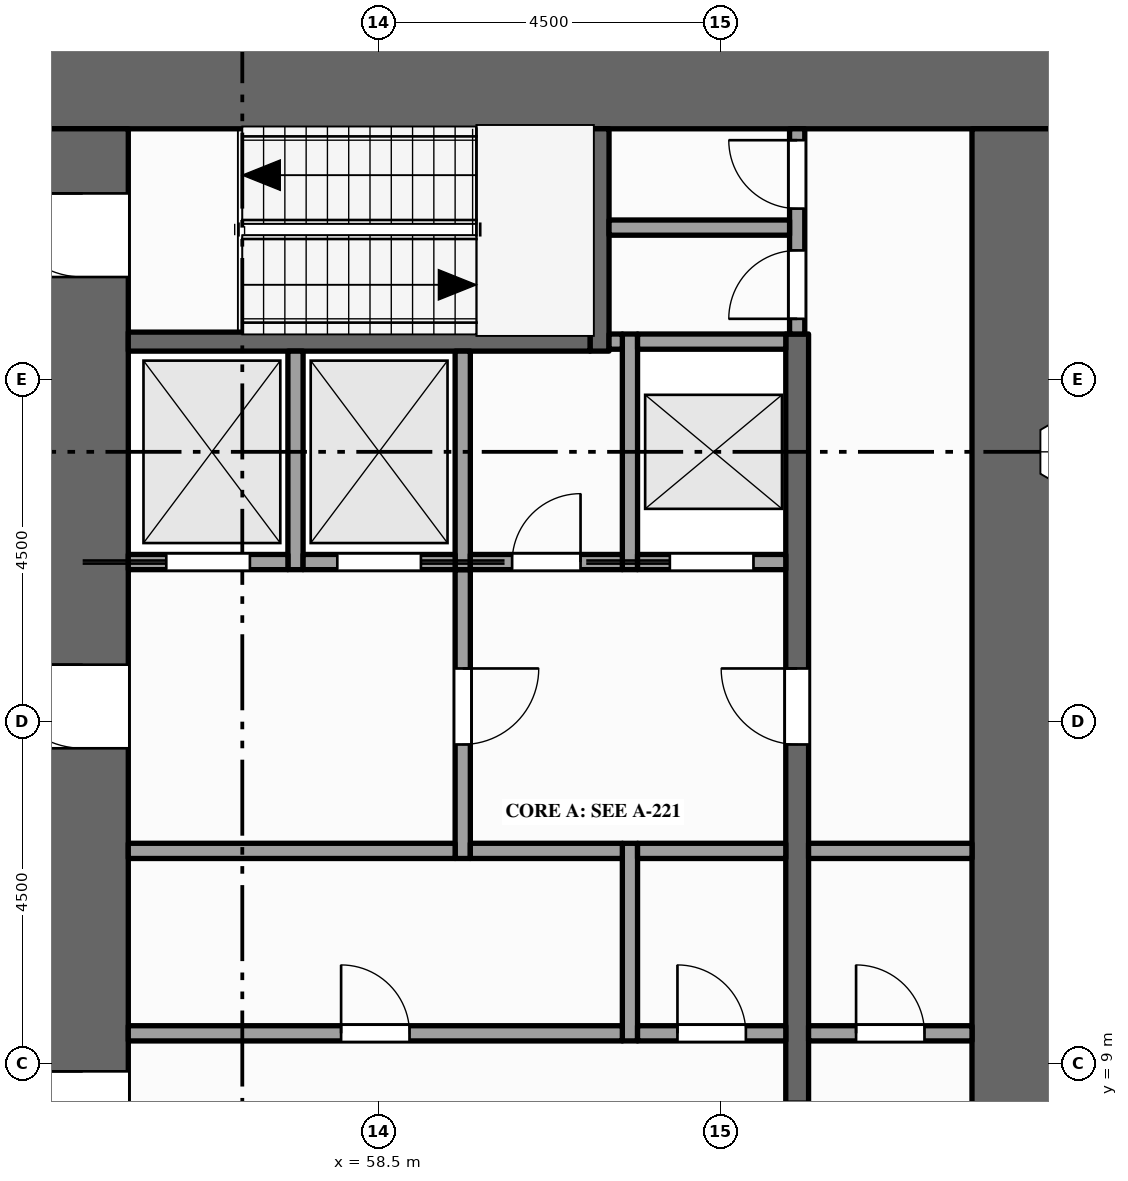
"""IFC4 building model, lengths in metres.
Left out: names, types, materials, properties, quantities, classifications, styles, units other than length and angle.
Written with IfcOpenShell. Run it as: python <this file> out.ifc"""

import sys

from ifc_helpers import new_model, si_unit, direction, frame, frame_2d, origin, place, context, subcontext, project, spatial, rectangle, extrude, element, fill, save


model = new_model("IFC4")
c1 = context("Model", 3, precision=1e-05, world=origin(), true_north=direction((0.0, 1.0)))
c2 = subcontext(c1, "Body", "Model", "MODEL_VIEW")
j1 = project(units=[si_unit("LENGTHUNIT", "METRE"), si_unit("PLANEANGLEUNIT", "RADIAN")], contexts=[c1])
p1 = place(None, origin())
s1 = spatial("IfcSite", under=j1, at=p1, CompositionType="ELEMENT")
p2 = place(p1, origin())
s2 = spatial("IfcBuilding", under=s1, at=p2, CompositionType="ELEMENT")
p3 = place(p2, frame((0.0, 0.0, 119.0)))
s3 = spatial("IfcBuildingStorey", under=s2, at=p3, CompositionType="ELEMENT", Elevation=119.0)
p4 = place(p3, frame((54.0, 21.9, -0.15), z_axis=(0.0, 0.0, 1.0), x_axis=(1.0, 0.0, 0.0)))
e1 = element("IfcWall", 1, at=p4, inside=s3, PredefinedType="SHEAR", context=c2, shape_type="SweptSolid", body=[
    extrude(rectangle(XDim=13.5, YDim=1.2, at=frame_2d((6.75, 0.0))), origin(), (0.0, 0.0, 1.0), 4.0),
])
p5 = place(p3, frame((54.6, 1.2, -0.15), z_axis=(0.0, 0.0, 1.0), x_axis=(0.0, 1.0, 0.0)))
e2 = element("IfcWall", 2, at=p5, inside=s3, PredefinedType="SHEAR", context=c2, shape_type="SweptSolid", body=[
    extrude(rectangle(XDim=20.1, YDim=1.2, at=frame_2d((10.05, 0.0))), origin(), (0.0, 0.0, 1.0), 4.0),
])
p6 = place(p5, frame((5.9, 0.0, 0.15)))
e3 = element("IfcOpeningElement", 3, at=p6, cuts=e2, PredefinedType="OPENING", context=c2, shape_type="SweptSolid", body=[
    extrude(rectangle(XDim=1.8, YDim=2.1, at=frame_2d((0.9, 1.05))), frame((0.0, 0.61, 0.0), z_axis=(0.0, -1.0, 0.0), x_axis=(1.0, 0.0, 0.0)), (0.0, 0.0, 1.0), 1.22),
])
p7 = place(p5, frame((11.95, 0.0, 0.15)))
e4 = element("IfcOpeningElement", 4, at=p7, cuts=e2, PredefinedType="OPENING", context=c2, shape_type="SweptSolid", body=[
    extrude(rectangle(XDim=1.1, YDim=2.1, at=frame_2d((0.55, 1.05))), frame((0.0, 0.61, 0.0), z_axis=(0.0, -1.0, 0.0), x_axis=(1.0, 0.0, 0.0)), (0.0, 0.0, 1.0), 1.22),
])
p8 = place(p5, frame((0.95, 0.0, 0.15)))
e5 = element("IfcOpeningElement", 5, at=p8, cuts=e2, PredefinedType="OPENING", context=c2, shape_type="SweptSolid", body=[
    extrude(rectangle(XDim=1.1, YDim=2.1, at=frame_2d((0.55, 1.05))), frame((0.0, 0.61, 0.0), z_axis=(0.0, -1.0, 0.0), x_axis=(1.0, 0.0, 0.0)), (0.0, 0.0, 1.0), 1.22),
])
p9 = place(p5, frame((18.15, 0.0, 0.15)))
e6 = element("IfcOpeningElement", 6, at=p9, cuts=e2, PredefinedType="OPENING", context=c2, shape_type="SweptSolid", body=[
    extrude(rectangle(XDim=1.1, YDim=2.1, at=frame_2d((0.55, 1.05))), frame((0.0, 0.61, 0.0), z_axis=(0.0, -1.0, 0.0), x_axis=(1.0, 0.0, 0.0)), (0.0, 0.0, 1.0), 1.22),
])
p10 = place(p3, frame((66.9, 1.2, -0.15), z_axis=(0.0, 0.0, 1.0), x_axis=(0.0, 1.0, 0.0)))
e7 = element("IfcWall", 7, at=p10, inside=s3, PredefinedType="SHEAR", context=c2, shape_type="SweptSolid", body=[
    extrude(rectangle(XDim=20.1, YDim=1.2, at=frame_2d((10.05, 0.0))), origin(), (0.0, 0.0, 1.0), 4.0),
])
p11 = place(p3, frame((57.4, 15.5, 0.0), z_axis=(0.0, 0.0, 1.0), x_axis=(0.0, 1.0, 0.0)))
e8 = element("IfcWall", 8, at=p11, inside=s3, PredefinedType="SOLIDWALL", context=c2, shape_type="SweptSolid", body=[
    extrude(rectangle(XDim=2.875, YDim=0.2, at=frame_2d((1.438, 0.0))), origin(), (0.0, 0.0, 1.0), 3.85),
])
p12 = place(p3, frame((59.6, 11.7, 0.0), z_axis=(0.0, 0.0, 1.0), x_axis=(0.0, 1.0, 0.0)))
e9 = element("IfcWall", 9, at=p12, inside=s3, PredefinedType="PARTITIONING", context=c2, shape_type="SweptSolid", body=[
    extrude(rectangle(XDim=3.8, YDim=0.2, at=frame_2d((1.9, 0.0))), origin(), (0.0, 0.0, 1.0), 3.85),
])
p13 = place(p12, frame((1.5, 0.0, 0.0)))
e10 = element("IfcOpeningElement", 10, at=p13, cuts=e9, PredefinedType="OPENING", context=c2, shape_type="SweptSolid", body=[
    extrude(rectangle(XDim=1.0, YDim=2.1, at=frame_2d((0.5, 1.05))), frame((0.0, 0.11, 0.0), z_axis=(0.0, -1.0, 0.0), x_axis=(1.0, 0.0, 0.0)), (0.0, 0.0, 1.0), 0.22),
])
p14 = place(p3, frame((59.6, 15.5, 0.0), z_axis=(0.0, 0.0, 1.0), x_axis=(0.0, 1.0, 0.0)))
e11 = element("IfcWall", 11, at=p14, inside=s3, PredefinedType="SOLIDWALL", context=c2, shape_type="SweptSolid", body=[
    extrude(rectangle(XDim=2.875, YDim=0.2, at=frame_2d((1.438, 0.0))), origin(), (0.0, 0.0, 1.0), 3.85),
])
p15 = place(p3, frame((61.4, 18.375, 0.0), z_axis=(0.0, 0.0, 1.0), x_axis=(0.0, 1.0, 0.0)))
e12 = element("IfcWall", 12, at=p15, inside=s3, PredefinedType="SHEAR", context=c2, shape_type="SweptSolid", body=[
    extrude(rectangle(XDim=2.925, YDim=0.25, at=frame_2d((1.462, 0.0))), origin(), (0.0, 0.0, 1.0), 3.85),
])
p16 = place(p3, frame((61.8, 9.3, 0.0), z_axis=(0.0, 0.0, 1.0), x_axis=(0.0, 1.0, 0.0)))
e13 = element("IfcWall", 13, at=p16, inside=s3, PredefinedType="PARTITIONING", context=c2, shape_type="SweptSolid", body=[
    extrude(rectangle(XDim=2.6, YDim=0.2, at=frame_2d((1.3, 0.0))), origin(), (0.0, 0.0, 1.0), 3.85),
])
p17 = place(p3, frame((61.8, 15.5, 0.0), z_axis=(0.0, 0.0, 1.0), x_axis=(0.0, 1.0, 0.0)))
e14 = element("IfcWall", 14, at=p17, inside=s3, PredefinedType="SOLIDWALL", context=c2, shape_type="SweptSolid", body=[
    extrude(rectangle(XDim=3.1, YDim=0.2, at=frame_2d((1.55, 0.0))), origin(), (0.0, 0.0, 1.0), 3.85),
])
p18 = place(p3, frame((64.0, 4.1, 0.0), z_axis=(0.0, 0.0, 1.0), x_axis=(0.0, 1.0, 0.0)))
e15 = element("IfcWall", 15, at=p18, inside=s3, PredefinedType="SHEAR", context=c2, shape_type="SweptSolid", body=[
    extrude(rectangle(XDim=14.5, YDim=0.3, at=frame_2d((7.25, 0.0))), origin(), (0.0, 0.0, 1.0), 3.85),
])
p19 = place(p18, frame((3.4, 0.0, 0.0)))
e16 = element("IfcOpeningElement", 16, at=p19, cuts=e15, PredefinedType="OPENING", context=c2, shape_type="SweptSolid", body=[
    extrude(rectangle(XDim=1.0, YDim=2.1, at=frame_2d((0.5, 1.05))), frame((0.0, 0.16, 0.0), z_axis=(0.0, -1.0, 0.0), x_axis=(1.0, 0.0, 0.0)), (0.0, 0.0, 1.0), 0.32),
])
p20 = place(p18, frame((9.1, 0.0, 0.0)))
e17 = element("IfcOpeningElement", 17, at=p20, cuts=e15, PredefinedType="OPENING", context=c2, shape_type="SweptSolid", body=[
    extrude(rectangle(XDim=1.0, YDim=2.1, at=frame_2d((0.5, 1.05))), frame((0.0, 0.16, 0.0), z_axis=(0.0, -1.0, 0.0), x_axis=(1.0, 0.0, 0.0)), (0.0, 0.0, 1.0), 0.32),
])
p21 = place(p3, frame((64.0, 18.6, 0.0), z_axis=(0.0, 0.0, 1.0), x_axis=(0.0, 1.0, 0.0)))
e18 = element("IfcWall", 18, at=p21, inside=s3, PredefinedType="PARTITIONING", context=c2, shape_type="SweptSolid", body=[
    extrude(rectangle(XDim=2.7, YDim=0.2, at=frame_2d((1.35, 0.0))), origin(), (0.0, 0.0, 1.0), 3.85),
])
p22 = place(p21, frame((0.2, 0.0, 0.0)))
e19 = element("IfcOpeningElement", 19, at=p22, cuts=e18, PredefinedType="OPENING", context=c2, shape_type="SweptSolid", body=[
    extrude(rectangle(XDim=0.9, YDim=2.1, at=frame_2d((0.45, 1.05))), frame((0.0, 0.11, 0.0), z_axis=(0.0, -1.0, 0.0), x_axis=(1.0, 0.0, 0.0)), (0.0, 0.0, 1.0), 0.22),
])
p23 = place(p21, frame((1.65, 0.0, 0.0)))
e20 = element("IfcOpeningElement", 20, at=p23, cuts=e18, PredefinedType="OPENING", context=c2, shape_type="SweptSolid", body=[
    extrude(rectangle(XDim=0.9, YDim=2.1, at=frame_2d((0.45, 1.05))), frame((0.0, 0.11, 0.0), z_axis=(0.0, -1.0, 0.0), x_axis=(1.0, 0.0, 0.0)), (0.0, 0.0, 1.0), 0.22),
])
p24 = place(p3, frame((55.2, 9.4, 0.0), z_axis=(0.0, 0.0, 1.0), x_axis=(1.0, 0.0, 0.0)))
e21 = element("IfcWall", 21, at=p24, inside=s3, PredefinedType="PARTITIONING", context=c2, shape_type="SweptSolid", body=[
    extrude(rectangle(XDim=6.5, YDim=0.2, at=frame_2d((3.25, 0.0))), origin(), (0.0, 0.0, 1.0), 3.85),
])
p25 = place(p24, frame((2.8, 0.0, 0.0)))
e22 = element("IfcOpeningElement", 22, at=p25, cuts=e21, PredefinedType="OPENING", context=c2, shape_type="SweptSolid", body=[
    extrude(rectangle(XDim=0.9, YDim=2.1, at=frame_2d((0.45, 1.05))), frame((0.0, 0.11, 0.0), z_axis=(0.0, -1.0, 0.0), x_axis=(1.0, 0.0, 0.0)), (0.0, 0.0, 1.0), 0.22),
])
p26 = place(p3, frame((61.9, 9.4, 0.0), z_axis=(0.0, 0.0, 1.0), x_axis=(1.0, 0.0, 0.0)))
e23 = element("IfcWall", 23, at=p26, inside=s3, PredefinedType="PARTITIONING", context=c2, shape_type="SweptSolid", body=[
    extrude(rectangle(XDim=1.95, YDim=0.2, at=frame_2d((0.975, 0.0))), origin(), (0.0, 0.0, 1.0), 3.85),
])
p27 = place(p26, frame((0.525, 0.0, 0.0)))
e24 = element("IfcOpeningElement", 24, at=p27, cuts=e23, PredefinedType="OPENING", context=c2, shape_type="SweptSolid", body=[
    extrude(rectangle(XDim=0.9, YDim=2.1, at=frame_2d((0.45, 1.05))), frame((0.0, 0.11, 0.0), z_axis=(0.0, -1.0, 0.0), x_axis=(1.0, 0.0, 0.0)), (0.0, 0.0, 1.0), 0.22),
])
p28 = place(p3, frame((64.15, 9.4, 0.0), z_axis=(0.0, 0.0, 1.0), x_axis=(1.0, 0.0, 0.0)))
e25 = element("IfcWall", 25, at=p28, inside=s3, PredefinedType="PARTITIONING", context=c2, shape_type="SweptSolid", body=[
    extrude(rectangle(XDim=2.15, YDim=0.2, at=frame_2d((1.075, 0.0))), origin(), (0.0, 0.0, 1.0), 3.85),
])
p29 = place(p28, frame((0.625, 0.0, 0.0)))
e26 = element("IfcOpeningElement", 26, at=p29, cuts=e25, PredefinedType="OPENING", context=c2, shape_type="SweptSolid", body=[
    extrude(rectangle(XDim=0.9, YDim=2.1, at=frame_2d((0.45, 1.05))), frame((0.0, 0.11, 0.0), z_axis=(0.0, -1.0, 0.0), x_axis=(1.0, 0.0, 0.0)), (0.0, 0.0, 1.0), 0.22),
])
p30 = place(p3, frame((55.2, 11.8, 0.0), z_axis=(0.0, 0.0, 1.0), x_axis=(1.0, 0.0, 0.0)))
e27 = element("IfcWall", 27, at=p30, inside=s3, PredefinedType="PARTITIONING", context=c2, shape_type="SweptSolid", body=[
    extrude(rectangle(XDim=4.3, YDim=0.2, at=frame_2d((2.15, 0.0))), origin(), (0.0, 0.0, 1.0), 3.85),
])
p31 = place(p3, frame((59.7, 11.8, 0.0), z_axis=(0.0, 0.0, 1.0), x_axis=(1.0, 0.0, 0.0)))
e28 = element("IfcWall", 28, at=p31, inside=s3, PredefinedType="PARTITIONING", context=c2, shape_type="SweptSolid", body=[
    extrude(rectangle(XDim=2.0, YDim=0.2, at=frame_2d((1.0, 0.0))), origin(), (0.0, 0.0, 1.0), 3.85),
])
p32 = place(p3, frame((61.9, 11.8, 0.0), z_axis=(0.0, 0.0, 1.0), x_axis=(1.0, 0.0, 0.0)))
e29 = element("IfcWall", 29, at=p32, inside=s3, PredefinedType="PARTITIONING", context=c2, shape_type="SweptSolid", body=[
    extrude(rectangle(XDim=1.95, YDim=0.2, at=frame_2d((0.975, 0.0))), origin(), (0.0, 0.0, 1.0), 3.85),
])
p33 = place(p3, frame((64.15, 11.8, 0.0), z_axis=(0.0, 0.0, 1.0), x_axis=(1.0, 0.0, 0.0)))
e30 = element("IfcWall", 30, at=p33, inside=s3, PredefinedType="PARTITIONING", context=c2, shape_type="SweptSolid", body=[
    extrude(rectangle(XDim=2.15, YDim=0.2, at=frame_2d((1.075, 0.0))), origin(), (0.0, 0.0, 1.0), 3.85),
])
p34 = place(p3, frame((55.2, 15.6, 0.0), z_axis=(0.0, 0.0, 1.0), x_axis=(1.0, 0.0, 0.0)))
e31 = element("IfcWall", 31, at=p34, inside=s3, PredefinedType="SOLIDWALL", context=c2, shape_type="SweptSolid", body=[
    extrude(rectangle(XDim=2.1, YDim=0.2, at=frame_2d((1.05, 0.0))), origin(), (0.0, 0.0, 1.0), 3.85),
])
p35 = place(p34, frame((0.5, 0.0, 0.012)))
e32 = element("IfcOpeningElement", 32, at=p35, cuts=e31, PredefinedType="OPENING", context=c2, shape_type="SweptSolid", body=[
    extrude(rectangle(XDim=1.1, YDim=2.1, at=frame_2d((0.55, 1.05))), frame((0.0, 0.11, 0.0), z_axis=(0.0, -1.0, 0.0), x_axis=(1.0, 0.0, 0.0)), (0.0, 0.0, 1.0), 0.22),
])
p36 = place(p3, frame((57.5, 15.6, 0.0), z_axis=(0.0, 0.0, 1.0), x_axis=(1.0, 0.0, 0.0)))
e33 = element("IfcWall", 33, at=p36, inside=s3, PredefinedType="SOLIDWALL", context=c2, shape_type="SweptSolid", body=[
    extrude(rectangle(XDim=2.0, YDim=0.2, at=frame_2d((1.0, 0.0))), origin(), (0.0, 0.0, 1.0), 3.85),
])
p37 = place(p36, frame((0.45, 0.0, 0.012)))
e34 = element("IfcOpeningElement", 34, at=p37, cuts=e33, PredefinedType="OPENING", context=c2, shape_type="SweptSolid", body=[
    extrude(rectangle(XDim=1.1, YDim=2.1, at=frame_2d((0.55, 1.05))), frame((0.0, 0.11, 0.0), z_axis=(0.0, -1.0, 0.0), x_axis=(1.0, 0.0, 0.0)), (0.0, 0.0, 1.0), 0.22),
])
p38 = place(p3, frame((59.7, 15.6, 0.0), z_axis=(0.0, 0.0, 1.0), x_axis=(1.0, 0.0, 0.0)))
e35 = element("IfcWall", 35, at=p38, inside=s3, PredefinedType="PARTITIONING", context=c2, shape_type="SweptSolid", body=[
    extrude(rectangle(XDim=2.0, YDim=0.2, at=frame_2d((1.0, 0.0))), origin(), (0.0, 0.0, 1.0), 3.85),
])
p39 = place(p38, frame((0.55, 0.0, 0.0)))
e36 = element("IfcOpeningElement", 36, at=p39, cuts=e35, PredefinedType="OPENING", context=c2, shape_type="SweptSolid", body=[
    extrude(rectangle(XDim=0.9, YDim=2.1, at=frame_2d((0.45, 1.05))), frame((0.0, 0.11, 0.0), z_axis=(0.0, -1.0, 0.0), x_axis=(1.0, 0.0, 0.0)), (0.0, 0.0, 1.0), 0.22),
])
p40 = place(p3, frame((61.9, 15.6, 0.0), z_axis=(0.0, 0.0, 1.0), x_axis=(1.0, 0.0, 0.0)))
e37 = element("IfcWall", 37, at=p40, inside=s3, PredefinedType="SOLIDWALL", context=c2, shape_type="SweptSolid", body=[
    extrude(rectangle(XDim=1.95, YDim=0.2, at=frame_2d((0.975, 0.0))), origin(), (0.0, 0.0, 1.0), 3.85),
])
p41 = place(p40, frame((0.425, 0.0, 0.012)))
e38 = element("IfcOpeningElement", 38, at=p41, cuts=e37, PredefinedType="OPENING", context=c2, shape_type="SweptSolid", body=[
    extrude(rectangle(XDim=1.1, YDim=2.1, at=frame_2d((0.55, 1.05))), frame((0.0, 0.11, 0.0), z_axis=(0.0, -1.0, 0.0), x_axis=(1.0, 0.0, 0.0)), (0.0, 0.0, 1.0), 0.22),
])
p42 = place(p3, frame((55.2, 18.5, 0.0), z_axis=(0.0, 0.0, 1.0), x_axis=(1.0, 0.0, 0.0)))
e39 = element("IfcWall", 39, at=p42, inside=s3, PredefinedType="SHEAR", context=c2, shape_type="SweptSolid", body=[
    extrude(rectangle(XDim=6.075, YDim=0.25, at=frame_2d((3.038, 0.0))), origin(), (0.0, 0.0, 1.0), 3.85),
])
p43 = place(p3, frame((61.525, 18.5, 0.0), z_axis=(0.0, 0.0, 1.0), x_axis=(1.0, 0.0, 0.0)))
e40 = element("IfcWall", 40, at=p43, inside=s3, PredefinedType="PARTITIONING", context=c2, shape_type="SweptSolid", body=[
    extrude(rectangle(XDim=0.175, YDim=0.2, at=frame_2d((0.087, 0.0))), origin(), (0.0, 0.0, 1.0), 3.85),
])
p44 = place(p3, frame((61.9, 18.5, 0.0), z_axis=(0.0, 0.0, 1.0), x_axis=(1.0, 0.0, 0.0)))
e41 = element("IfcWall", 41, at=p44, inside=s3, PredefinedType="SOLIDWALL", context=c2, shape_type="SweptSolid", body=[
    extrude(rectangle(XDim=1.95, YDim=0.2, at=frame_2d((0.975, 0.0))), origin(), (0.0, 0.0, 1.0), 3.85),
])
p45 = place(p3, frame((61.525, 20.0, 0.0), z_axis=(0.0, 0.0, 1.0), x_axis=(1.0, 0.0, 0.0)))
e42 = element("IfcWall", 42, at=p45, inside=s3, PredefinedType="PARTITIONING", context=c2, shape_type="SweptSolid", body=[
    extrude(rectangle(XDim=2.375, YDim=0.2, at=frame_2d((1.188, 0.0))), origin(), (0.0, 0.0, 1.0), 3.85),
])
p46 = place(p35, origin())
e43 = element("IfcDoor", 43, at=p46, inside=s3, OperationType="SLIDING_TO_LEFT", PredefinedType="DOOR", context=c2, shape_type="SweptSolid", body=[
    extrude(rectangle(XDim=1.1, YDim=2.1, at=frame_2d((0.55, 1.05))), frame((0.0, 0.025, 0.0), z_axis=(0.0, -1.0, 0.0), x_axis=(1.0, 0.0, 0.0)), (0.0, 0.0, 1.0), 0.05),
])
fill(e32, e43)
p47 = place(p37, origin())
e44 = element("IfcDoor", 44, at=p47, inside=s3, OperationType="SLIDING_TO_RIGHT", PredefinedType="DOOR", context=c2, shape_type="SweptSolid", body=[
    extrude(rectangle(XDim=1.1, YDim=2.1, at=frame_2d((0.55, 1.05))), frame((0.0, 0.025, 0.0), z_axis=(0.0, -1.0, 0.0), x_axis=(1.0, 0.0, 0.0)), (0.0, 0.0, 1.0), 0.05),
])
fill(e34, e44)
p48 = place(p41, origin())
e45 = element("IfcDoor", 45, at=p48, inside=s3, OperationType="SLIDING_TO_LEFT", PredefinedType="DOOR", context=c2, shape_type="SweptSolid", body=[
    extrude(rectangle(XDim=1.1, YDim=2.1, at=frame_2d((0.55, 1.05))), frame((0.0, 0.025, 0.0), z_axis=(0.0, -1.0, 0.0), x_axis=(1.0, 0.0, 0.0)), (0.0, 0.0, 1.0), 0.05),
])
fill(e38, e45)
p49 = place(p6, origin())
e46 = element("IfcDoor", 46, at=p49, inside=s3, OperationType="DOUBLE_DOOR_SINGLE_SWING", PredefinedType="DOOR", context=c2, shape_type="SweptSolid", body=[
    extrude(rectangle(XDim=1.8, YDim=2.1, at=frame_2d((0.9, 1.05))), frame((0.0, 0.025, 0.0), z_axis=(0.0, -1.0, 0.0), x_axis=(1.0, 0.0, 0.0)), (0.0, 0.0, 1.0), 0.05),
])
fill(e3, e46)
p50 = place(p7, origin())
e47 = element("IfcDoor", 47, at=p50, inside=s3, OperationType="SINGLE_SWING_RIGHT", PredefinedType="DOOR", context=c2, shape_type="SweptSolid", body=[
    extrude(rectangle(XDim=1.1, YDim=2.1, at=frame_2d((0.55, 1.05))), frame((0.0, 0.025, 0.0), z_axis=(0.0, -1.0, 0.0), x_axis=(1.0, 0.0, 0.0)), (0.0, 0.0, 1.0), 0.05),
])
fill(e4, e47)
p51 = place(p13, origin())
e48 = element("IfcDoor", 48, at=p51, inside=s3, OperationType="SINGLE_SWING_RIGHT", PredefinedType="DOOR", context=c2, shape_type="SweptSolid", body=[
    extrude(rectangle(XDim=1.0, YDim=2.1, at=frame_2d((0.5, 1.05))), frame((0.0, 0.025, 0.0), z_axis=(0.0, -1.0, 0.0), x_axis=(1.0, 0.0, 0.0)), (0.0, 0.0, 1.0), 0.05),
])
fill(e10, e48)
p52 = place(p20, origin())
e49 = element("IfcDoor", 49, at=p52, inside=s3, OperationType="SINGLE_SWING_RIGHT", PredefinedType="DOOR", context=c2, shape_type="SweptSolid", body=[
    extrude(rectangle(XDim=1.0, YDim=2.1, at=frame_2d((0.5, 1.05))), frame((0.0, 0.025, 0.0), z_axis=(0.0, -1.0, 0.0), x_axis=(1.0, 0.0, 0.0)), (0.0, 0.0, 1.0), 0.05),
])
fill(e17, e49)
p53 = place(p29, origin())
e50 = element("IfcDoor", 50, at=p53, inside=s3, OperationType="SINGLE_SWING_LEFT", PredefinedType="DOOR", context=c2, shape_type="SweptSolid", body=[
    extrude(rectangle(XDim=0.9, YDim=2.1, at=frame_2d((0.45, 1.05))), frame((0.0, 0.025, 0.0), z_axis=(0.0, -1.0, 0.0), x_axis=(1.0, 0.0, 0.0)), (0.0, 0.0, 1.0), 0.05),
])
fill(e26, e50)
p54 = place(p9, origin())
e51 = element("IfcDoor", 51, at=p54, inside=s3, OperationType="SINGLE_SWING_RIGHT", PredefinedType="DOOR", context=c2, shape_type="SweptSolid", body=[
    extrude(rectangle(XDim=1.1, YDim=2.1, at=frame_2d((0.55, 1.05))), frame((0.0, 0.025, 0.0), z_axis=(0.0, -1.0, 0.0), x_axis=(1.0, 0.0, 0.0)), (0.0, 0.0, 1.0), 0.05),
])
fill(e6, e51)
p55 = place(p22, origin())
e52 = element("IfcDoor", 52, at=p55, inside=s3, OperationType="SINGLE_SWING_LEFT", PredefinedType="DOOR", context=c2, shape_type="SweptSolid", body=[
    extrude(rectangle(XDim=0.9, YDim=2.1, at=frame_2d((0.45, 1.05))), frame((0.0, 0.025, 0.0), z_axis=(0.0, -1.0, 0.0), x_axis=(1.0, 0.0, 0.0)), (0.0, 0.0, 1.0), 0.05),
])
fill(e19, e52)
p56 = place(p23, origin())
e53 = element("IfcDoor", 53, at=p56, inside=s3, OperationType="SINGLE_SWING_RIGHT", PredefinedType="DOOR", context=c2, shape_type="SweptSolid", body=[
    extrude(rectangle(XDim=0.9, YDim=2.1, at=frame_2d((0.45, 1.05))), frame((0.0, 0.025, 0.0), z_axis=(0.0, -1.0, 0.0), x_axis=(1.0, 0.0, 0.0)), (0.0, 0.0, 1.0), 0.05),
])
fill(e20, e53)
p57 = place(p25, origin())
e54 = element("IfcDoor", 54, at=p57, inside=s3, OperationType="SINGLE_SWING_LEFT", PredefinedType="DOOR", context=c2, shape_type="SweptSolid", body=[
    extrude(rectangle(XDim=0.9, YDim=2.1, at=frame_2d((0.45, 1.05))), frame((0.0, 0.025, 0.0), z_axis=(0.0, -1.0, 0.0), x_axis=(1.0, 0.0, 0.0)), (0.0, 0.0, 1.0), 0.05),
])
fill(e22, e54)
p58 = place(p27, origin())
e55 = element("IfcDoor", 55, at=p58, inside=s3, OperationType="SINGLE_SWING_LEFT", PredefinedType="DOOR", context=c2, shape_type="SweptSolid", body=[
    extrude(rectangle(XDim=0.9, YDim=2.1, at=frame_2d((0.45, 1.05))), frame((0.0, 0.025, 0.0), z_axis=(0.0, -1.0, 0.0), x_axis=(1.0, 0.0, 0.0)), (0.0, 0.0, 1.0), 0.05),
])
fill(e24, e55)
p59 = place(p39, origin())
e56 = element("IfcDoor", 56, at=p59, inside=s3, OperationType="SINGLE_SWING_RIGHT", PredefinedType="DOOR", context=c2, shape_type="SweptSolid", body=[
    extrude(rectangle(XDim=0.9, YDim=2.1, at=frame_2d((0.45, 1.05))), frame((0.0, 0.025, 0.0), z_axis=(0.0, -1.0, 0.0), x_axis=(1.0, 0.0, 0.0)), (0.0, 0.0, 1.0), 0.05),
])
fill(e36, e56)
save(model, sys.argv[1])
